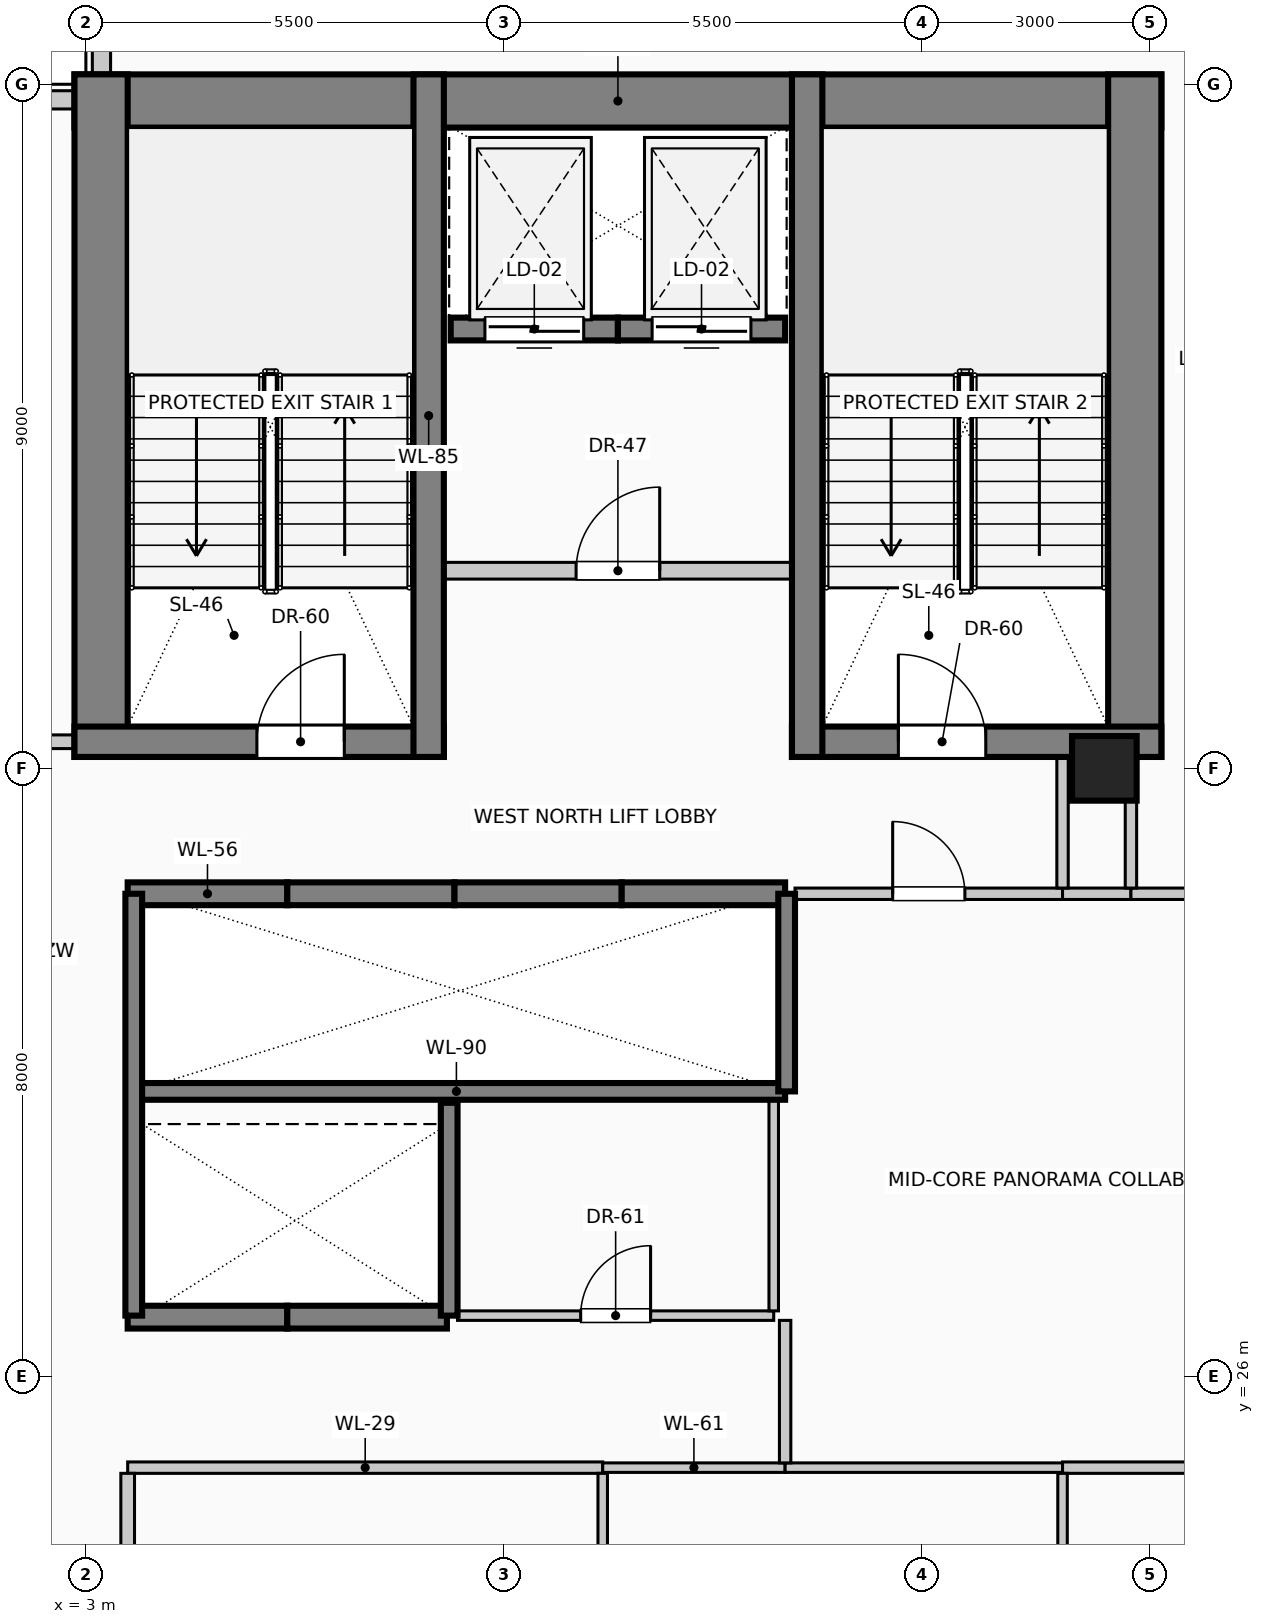
"""IFC4 building model, lengths in metres.
Left out: names, types, materials, properties, quantities, classifications, styles, units other than length and angle.
Written with IfcOpenShell. Run it as: python <this file> out.ifc"""

import sys

from ifc_helpers import new_model, si_unit, direction, frame, frame_2d, origin, origin_2d, place, context, subcontext, project, spatial, rectangle, circle, extrude, element, fill, save


model = new_model("IFC4")
c1 = context("Model", 3, precision=1e-05, world=origin(), true_north=direction((0.0, 1.0)))
c2 = subcontext(c1, "Body", "Model", "MODEL_VIEW")
j1 = project(units=[si_unit("LENGTHUNIT", "METRE"), si_unit("PLANEANGLEUNIT", "RADIAN")], contexts=[c1])
p1 = place(None, origin())
s1 = spatial("IfcSite", under=j1, at=p1, CompositionType="ELEMENT")
p2 = place(p1, origin())
s2 = spatial("IfcBuilding", under=s1, at=p2, CompositionType="ELEMENT")
p3 = place(p2, frame((0.0, 0.0, 234.6)))
s3 = spatial("IfcBuildingStorey", under=s2, at=p3, CompositionType="ELEMENT", Elevation=234.6)
p4 = place(p3, frame((2.85, 42.78, 0.0), z_axis=(0.0, 0.0, 1.0), x_axis=(1.0, 0.0, 0.0)))
e1 = element("IfcWall", 1, at=p4, inside=s3, PredefinedType="SHEAR", context=c2, shape_type="SweptSolid", body=[
    extrude(rectangle(XDim=14.3, YDim=0.7, at=frame_2d((7.15, 0.0))), origin(), (0.0, 0.0, 1.0), 4.0),
])
for number, where, z_axis, x_axis in (
    (2, (3.2, 34.15, 0.0), (0.0, 0.0, 1.0), (0.0, 1.0, 0.0)),
    (3, (16.8, 34.15, 0.0), (0.0, 0.0, 1.0), (0.0, 1.0, 0.0)),
):
    element("IfcWall", number, at=place(p3, frame(where, z_axis=z_axis, x_axis=x_axis)), inside=s3, PredefinedType="SHEAR", context=c2, shape_type="SweptSolid", body=[
        extrude(rectangle(XDim=8.98, YDim=0.7, at=frame_2d((4.49, 0.0))), origin(), (0.0, 0.0, 1.0), 4.0),
    ])
p5 = place(p3, frame((2.85, 34.35, 0.0), z_axis=(0.0, 0.0, 1.0), x_axis=(1.0, 0.0, 0.0)))
e4 = element("IfcWall", 4, at=p5, inside=s3, PredefinedType="SHEAR", context=c2, shape_type="SweptSolid", body=[
    extrude(rectangle(XDim=4.86, YDim=0.4, at=frame_2d((2.43, 0.0))), origin(), (0.0, 0.0, 1.0), 4.0),
])
p6 = place(p5, frame((2.4, 0.0, 0.0)))
e5 = element("IfcOpeningElement", 5, at=p6, cuts=e4, PredefinedType="OPENING", context=c2, shape_type="SweptSolid", body=[
    extrude(rectangle(XDim=1.15, YDim=2.2, at=frame_2d((0.575, 1.1))), frame((0.0, 0.21, 0.0), z_axis=(0.0, -1.0, 0.0), x_axis=(1.0, 0.0, 0.0)), (0.0, 0.0, 1.0), 0.42),
])
p7 = place(p3, frame((12.29, 34.35, 0.0), z_axis=(0.0, 0.0, 1.0), x_axis=(1.0, 0.0, 0.0)))
e6 = element("IfcWall", 6, at=p7, inside=s3, PredefinedType="SHEAR", context=c2, shape_type="SweptSolid", body=[
    extrude(rectangle(XDim=4.86, YDim=0.4, at=frame_2d((2.43, 0.0))), origin(), (0.0, 0.0, 1.0), 4.0),
])
p8 = place(p7, frame((1.4, 0.0, 0.0)))
e7 = element("IfcOpeningElement", 7, at=p8, cuts=e6, PredefinedType="OPENING", context=c2, shape_type="SweptSolid", body=[
    extrude(rectangle(XDim=1.15, YDim=2.2, at=frame_2d((0.575, 1.1))), frame((0.0, 0.21, 0.0), z_axis=(0.0, -1.0, 0.0), x_axis=(1.0, 0.0, 0.0)), (0.0, 0.0, 1.0), 0.42),
])
for number, where, z_axis, x_axis in (
    (8, (7.51, 34.15, 0.0), (0.0, 0.0, 1.0), (0.0, 1.0, 0.0)),
    (9, (12.49, 34.15, 0.0), (0.0, 0.0, 1.0), (0.0, 1.0, 0.0)),
):
    element("IfcWall", number, at=place(p3, frame(where, z_axis=z_axis, x_axis=x_axis)), inside=s3, PredefinedType="SHEAR", context=c2, shape_type="SweptSolid", body=[
        extrude(rectangle(XDim=8.98, YDim=0.4, at=frame_2d((4.49, 0.0))), origin(), (0.0, 0.0, 1.0), 4.0),
    ])
p9 = place(p3, frame((16.4, 34.0, 0.0), z_axis=(0.0, 0.0, 1.0), x_axis=(1.0, 0.0, 0.0)))
e10 = element("IfcColumn", 10, at=p9, inside=s3, PredefinedType="COLUMN", context=c2, shape_type="SweptSolid", body=[
    extrude(circle(Radius=0.425, at=origin_2d()), origin(), (0.0, 0.0, 1.0), 4.0),
])
p10 = place(p3, frame((0.6, 42.795, 0.0), z_axis=(0.0, 0.0, 1.0), x_axis=(1.0, 0.0, 0.0)))
e11 = element("IfcWall", 11, at=p10, inside=s3, PredefinedType="SOLIDWALL", context=c2, shape_type="SweptSolid", body=[
    extrude(rectangle(XDim=2.245, YDim=0.24, at=frame_2d((1.123, 0.0))), origin(), (0.0, 0.0, 1.0), 3.66),
])
p11 = place(p3, frame((3.205, 43.135, 0.0), z_axis=(0.0, 0.0, 1.0), x_axis=(0.0, 1.0, 0.0)))
e12 = element("IfcWall", 12, at=p11, inside=s3, PredefinedType="SOLIDWALL", context=c2, shape_type="SweptSolid", body=[
    extrude(rectangle(XDim=2.265, YDim=0.24, at=frame_2d((1.132, 0.0))), origin(), (0.0, 0.0, 1.0), 3.66),
])
p12 = place(p3, frame((3.55, 32.35, 0.0), z_axis=(0.0, 0.0, 1.0), x_axis=(1.0, 0.0, 0.0)))
e13 = element("IfcWall", 13, at=p12, inside=s3, PredefinedType="SOLIDWALL", context=c2, shape_type="SweptSolid", body=[
    extrude(rectangle(XDim=2.1, YDim=0.3, at=frame_2d((1.05, 0.0))), origin(), (0.0, 0.0, 1.0), 4.0),
])
p13 = place(p3, frame((5.65, 32.35, 0.0), z_axis=(0.0, 0.0, 1.0), x_axis=(1.0, 0.0, 0.0)))
e14 = element("IfcWall", 14, at=p13, inside=s3, PredefinedType="SOLIDWALL", context=c2, shape_type="SweptSolid", body=[
    extrude(rectangle(XDim=2.2, YDim=0.3, at=frame_2d((1.1, 0.0))), origin(), (0.0, 0.0, 1.0), 4.0),
])
p14 = place(p3, frame((7.85, 32.35, 0.0), z_axis=(0.0, 0.0, 1.0), x_axis=(1.0, 0.0, 0.0)))
e15 = element("IfcWall", 15, at=p14, inside=s3, PredefinedType="SOLIDWALL", context=c2, shape_type="SweptSolid", body=[
    extrude(rectangle(XDim=2.2, YDim=0.3, at=frame_2d((1.1, 0.0))), origin(), (0.0, 0.0, 1.0), 4.0),
])
p15 = place(p3, frame((10.05, 32.35, 0.0), z_axis=(0.0, 0.0, 1.0), x_axis=(1.0, 0.0, 0.0)))
e16 = element("IfcWall", 16, at=p15, inside=s3, PredefinedType="SOLIDWALL", context=c2, shape_type="SweptSolid", body=[
    extrude(rectangle(XDim=2.15, YDim=0.3, at=frame_2d((1.075, 0.0))), origin(), (0.0, 0.0, 1.0), 4.0),
])
p16 = place(p3, frame((5.65, 26.78, 0.0), z_axis=(0.0, 0.0, 1.0), x_axis=(-1.0, 0.0, 0.0)))
e17 = element("IfcWall", 17, at=p16, inside=s3, PredefinedType="SOLIDWALL", context=c2, shape_type="SweptSolid", body=[
    extrude(rectangle(XDim=2.1, YDim=0.3, at=frame_2d((1.05, 0.0))), origin(), (0.0, 0.0, 1.0), 4.0),
])
p17 = place(p3, frame((7.75, 26.78, 0.0), z_axis=(0.0, 0.0, 1.0), x_axis=(-1.0, 0.0, 0.0)))
e18 = element("IfcWall", 18, at=p17, inside=s3, PredefinedType="SOLIDWALL", context=c2, shape_type="SweptSolid", body=[
    extrude(rectangle(XDim=2.1, YDim=0.3, at=frame_2d((1.05, 0.0))), origin(), (0.0, 0.0, 1.0), 4.0),
])
p18 = place(p3, frame((10.0, 39.78, 0.0), z_axis=(0.0, 0.0, 1.0), x_axis=(-1.0, 0.0, 0.0)))
e19 = element("IfcWall", 19, at=p18, inside=s3, PredefinedType="SOLIDWALL", context=c2, shape_type="SweptSolid", body=[
    extrude(rectangle(XDim=2.2, YDim=0.3, at=frame_2d((1.1, 0.0))), origin(), (0.0, 0.0, 1.0), 4.0),
])
p19 = place(p18, frame((0.45, 0.0, 0.0)))
e20 = element("IfcOpeningElement", 20, at=p19, cuts=e19, PredefinedType="OPENING", context=c2, shape_type="SweptSolid", body=[
    extrude(rectangle(XDim=1.3, YDim=2.25, at=frame_2d((0.65, 1.125))), frame((0.0, 0.16, 0.0), z_axis=(0.0, -1.0, 0.0), x_axis=(1.0, 0.0, 0.0)), (0.0, 0.0, 1.0), 0.32),
])
p20 = place(p3, frame((12.2, 39.78, 0.0), z_axis=(0.0, 0.0, 1.0), x_axis=(-1.0, 0.0, 0.0)))
e21 = element("IfcWall", 21, at=p20, inside=s3, PredefinedType="SOLIDWALL", context=c2, shape_type="SweptSolid", body=[
    extrude(rectangle(XDim=2.2, YDim=0.3, at=frame_2d((1.1, 0.0))), origin(), (0.0, 0.0, 1.0), 4.0),
])
p21 = place(p20, frame((0.45, 0.0, 0.0)))
e22 = element("IfcOpeningElement", 22, at=p21, cuts=e21, PredefinedType="OPENING", context=c2, shape_type="SweptSolid", body=[
    extrude(rectangle(XDim=1.3, YDim=2.25, at=frame_2d((0.65, 1.125))), frame((0.0, 0.16, 0.0), z_axis=(0.0, -1.0, 0.0), x_axis=(1.0, 0.0, 0.0)), (0.0, 0.0, 1.0), 0.32),
])
p22 = place(p3, frame((3.55, 29.75, 0.0), z_axis=(0.0, 0.0, 1.0), x_axis=(1.0, 0.0, 0.0)))
e23 = element("IfcWall", 23, at=p22, inside=s3, PredefinedType="SOLIDWALL", context=c2, shape_type="SweptSolid", body=[
    extrude(rectangle(XDim=8.65, YDim=0.22, at=frame_2d((4.325, 0.0))), origin(), (0.0, 0.0, 1.0), 4.0),
])
p23 = place(p3, frame((3.63, 26.8, 0.0), z_axis=(0.0, 0.0, 1.0), x_axis=(0.0, 1.0, 0.0)))
e24 = element("IfcWall", 24, at=p23, inside=s3, PredefinedType="SOLIDWALL", context=c2, shape_type="SweptSolid", body=[
    extrude(rectangle(XDim=5.55, YDim=0.22, at=frame_2d((2.775, 0.0))), origin(), (0.0, 0.0, 1.0), 4.0),
])
p24 = place(p3, frame((7.78, 26.8, 0.0), z_axis=(0.0, 0.0, 1.0), x_axis=(0.0, 1.0, 0.0)))
e25 = element("IfcWall", 25, at=p24, inside=s3, PredefinedType="SOLIDWALL", context=c2, shape_type="SweptSolid", body=[
    extrude(rectangle(XDim=2.8, YDim=0.22, at=frame_2d((1.4, 0.0))), origin(), (0.0, 0.0, 1.0), 4.0),
])
p25 = place(p3, frame((12.22, 29.75, 0.0), z_axis=(0.0, 0.0, 1.0), x_axis=(0.0, 1.0, 0.0)))
e26 = element("IfcWall", 26, at=p25, inside=s3, PredefinedType="SOLIDWALL", context=c2, shape_type="SweptSolid", body=[
    extrude(rectangle(XDim=2.6, YDim=0.22, at=frame_2d((1.3, 0.0))), origin(), (0.0, 0.0, 1.0), 4.0),
])
p26 = place(p3, frame((7.51, 36.6, 0.0), z_axis=(0.0, 0.0, 1.0), x_axis=(1.0, 0.0, 0.0)))
e27 = element("IfcWall", 27, at=p26, inside=s3, PredefinedType="PARTITIONING", context=c2, shape_type="SweptSolid", body=[
    extrude(rectangle(XDim=4.98, YDim=0.22, at=frame_2d((2.49, 0.0))), origin(), (0.0, 0.0, 1.0), 3.66),
])
p27 = place(p26, frame((1.94, 0.0, 0.0)))
e28 = element("IfcOpeningElement", 28, at=p27, cuts=e27, PredefinedType="OPENING", context=c2, shape_type="SweptSolid", body=[
    extrude(rectangle(XDim=1.1, YDim=2.2, at=frame_2d((0.55, 1.1))), frame((0.0, 0.12, 0.0), z_axis=(0.0, -1.0, 0.0), x_axis=(1.0, 0.0, 0.0)), (0.0, 0.0, 1.0), 0.24),
])
p28 = place(p3, frame((3.55, 24.8, 0.0), z_axis=(0.0, 0.0, 1.0), x_axis=(1.0, 0.0, 0.0)))
e29 = element("IfcWall", 29, at=p28, inside=s3, PredefinedType="PARTITIONING", context=c2, shape_type="SweptSolid", body=[
    extrude(rectangle(XDim=6.25, YDim=0.15, at=frame_2d((3.125, 0.0))), origin(), (0.0, 0.0, 1.0), 3.66),
])
p29 = place(p3, frame((9.8, 24.8, 0.0), z_axis=(0.0, 0.0, 1.0), x_axis=(1.0, 0.0, 0.0)))
e30 = element("IfcWall", 30, at=p29, inside=s3, PredefinedType="PARTITIONING", context=c2, shape_type="SweptSolid", body=[
    extrude(rectangle(XDim=2.4, YDim=0.125, at=frame_2d((1.2, 0.0))), origin(), (0.0, 0.0, 1.0), 3.66),
])
p30 = place(p3, frame((12.2, 24.8, 0.0), z_axis=(0.0, 0.0, 1.0), x_axis=(1.0, 0.0, 0.0)))
e31 = element("IfcWall", 31, at=p30, inside=s3, PredefinedType="PARTITIONING", context=c2, shape_type="SweptSolid", body=[
    extrude(rectangle(XDim=3.65, YDim=0.125, at=frame_2d((1.825, 0.0))), origin(), (0.0, 0.0, 1.0), 3.66),
])
p31 = place(p3, frame((15.85, 24.8, 0.0), z_axis=(0.0, 0.0, 1.0), x_axis=(1.0, 0.0, 0.0)))
e32 = element("IfcWall", 32, at=p31, inside=s3, PredefinedType="PARTITIONING", context=c2, shape_type="SweptSolid", body=[
    extrude(rectangle(XDim=5.15, YDim=0.15, at=frame_2d((2.575, 0.0))), origin(), (0.0, 0.0, 1.0), 3.66),
])
p32 = place(p3, frame((7.89, 26.8, 0.0), z_axis=(0.0, 0.0, 1.0), x_axis=(1.0, 0.0, 0.0)))
e33 = element("IfcWall", 33, at=p32, inside=s3, PredefinedType="PARTITIONING", context=c2, shape_type="SweptSolid", body=[
    extrude(rectangle(XDim=4.16, YDim=0.125, at=frame_2d((2.08, 0.0))), origin(), (0.0, 0.0, 1.0), 3.66),
])
p33 = place(p32, frame((1.62, 0.0, 0.0)))
e34 = element("IfcOpeningElement", 34, at=p33, cuts=e33, PredefinedType="OPENING", context=c2, shape_type="SweptSolid", body=[
    extrude(rectangle(XDim=0.92, YDim=2.1, at=frame_2d((0.46, 1.05))), frame((0.0, 0.073, 0.0), z_axis=(0.0, -1.0, 0.0), x_axis=(1.0, 0.0, 0.0)), (0.0, 0.0, 1.0), 0.145),
])
p34 = place(p3, frame((12.33, 32.35, 0.0), z_axis=(0.0, 0.0, 1.0), x_axis=(1.0, 0.0, 0.0)))
e35 = element("IfcWall", 35, at=p34, inside=s3, PredefinedType="PARTITIONING", context=c2, shape_type="SweptSolid", body=[
    extrude(rectangle(XDim=3.52, YDim=0.15, at=frame_2d((1.76, 0.0))), origin(), (0.0, 0.0, 1.0), 3.66),
])
p35 = place(p34, frame((1.285, 0.0, 0.0)))
e36 = element("IfcOpeningElement", 36, at=p35, cuts=e35, PredefinedType="OPENING", context=c2, shape_type="SweptSolid", body=[
    extrude(rectangle(XDim=0.95, YDim=2.15, at=frame_2d((0.475, 1.075))), frame((0.0, 0.085, 0.0), z_axis=(0.0, -1.0, 0.0), x_axis=(1.0, 0.0, 0.0)), (0.0, 0.0, 1.0), 0.17),
])
p36 = place(p3, frame((15.85, 32.35, 0.0), z_axis=(0.0, 0.0, 1.0), x_axis=(1.0, 0.0, 0.0)))
e37 = element("IfcWall", 37, at=p36, inside=s3, PredefinedType="PARTITIONING", context=c2, shape_type="SweptSolid", body=[
    extrude(rectangle(XDim=0.9, YDim=0.15, at=frame_2d((0.45, 0.0))), origin(), (0.0, 0.0, 1.0), 3.66),
])
p37 = place(p3, frame((16.75, 32.35, 0.0), z_axis=(0.0, 0.0, 1.0), x_axis=(1.0, 0.0, 0.0)))
e38 = element("IfcWall", 38, at=p37, inside=s3, PredefinedType="PARTITIONING", context=c2, shape_type="SweptSolid", body=[
    extrude(rectangle(XDim=4.25, YDim=0.15, at=frame_2d((2.125, 0.0))), origin(), (0.0, 0.0, 1.0), 3.66),
])
p38 = place(p3, frame((1.1, 34.35, 0.0), z_axis=(0.0, 0.0, 1.0), x_axis=(1.0, 0.0, 0.0)))
e39 = element("IfcWall", 39, at=p38, inside=s3, PredefinedType="PARTITIONING", context=c2, shape_type="SweptSolid", body=[
    extrude(rectangle(XDim=1.75, YDim=0.18, at=frame_2d((0.875, 0.0))), origin(), (0.0, 0.0, 1.0), 3.66),
])
p39 = place(p3, frame((3.55, 17.39, 0.0), z_axis=(0.0, 0.0, 1.0), x_axis=(0.0, 1.0, 0.0)))
e40 = element("IfcWall", 40, at=p39, inside=s3, PredefinedType="PARTITIONING", context=c2, shape_type="SweptSolid", body=[
    extrude(rectangle(XDim=7.335, YDim=0.18, at=frame_2d((3.667, 0.0))), origin(), (0.0, 0.0, 1.0), 3.66),
])
p40 = place(p3, frame((9.8, 17.39, 0.0), z_axis=(0.0, 0.0, 1.0), x_axis=(0.0, 1.0, 0.0)))
e41 = element("IfcWall", 41, at=p40, inside=s3, PredefinedType="PARTITIONING", context=c2, shape_type="SweptSolid", body=[
    extrude(rectangle(XDim=7.335, YDim=0.125, at=frame_2d((3.667, 0.0))), origin(), (0.0, 0.0, 1.0), 3.66),
])
p41 = place(p3, frame((12.05, 26.863, 0.0), z_axis=(0.0, 0.0, 1.0), x_axis=(0.0, 1.0, 0.0)))
e42 = element("IfcWall", 42, at=p41, inside=s3, PredefinedType="PARTITIONING", context=c2, shape_type="SweptSolid", body=[
    extrude(rectangle(XDim=2.777, YDim=0.125, at=frame_2d((1.389, 0.0))), origin(), (0.0, 0.0, 1.0), 3.66),
])
p42 = place(p3, frame((12.2, 24.863, 0.0), z_axis=(0.0, 0.0, 1.0), x_axis=(0.0, 1.0, 0.0)))
e43 = element("IfcWall", 43, at=p42, inside=s3, PredefinedType="PARTITIONING", context=c2, shape_type="SweptSolid", body=[
    extrude(rectangle(XDim=1.875, YDim=0.15, at=frame_2d((0.938, 0.0))), origin(), (0.0, 0.0, 1.0), 3.66),
])
p43 = place(p3, frame((15.85, 17.39, 0.0), z_axis=(0.0, 0.0, 1.0), x_axis=(0.0, 1.0, 0.0)))
e44 = element("IfcWall", 44, at=p43, inside=s3, PredefinedType="PARTITIONING", context=c2, shape_type="SweptSolid", body=[
    extrude(rectangle(XDim=7.335, YDim=0.125, at=frame_2d((3.667, 0.0))), origin(), (0.0, 0.0, 1.0), 3.66),
])
p44 = place(p3, frame((15.85, 32.425, 0.0), z_axis=(0.0, 0.0, 1.0), x_axis=(0.0, 1.0, 0.0)))
e45 = element("IfcWall", 45, at=p44, inside=s3, PredefinedType="PARTITIONING", context=c2, shape_type="SweptSolid", body=[
    extrude(rectangle(XDim=1.725, YDim=0.15, at=frame_2d((0.862, 0.0))), origin(), (0.0, 0.0, 1.0), 3.66),
])
p45 = place(p3, frame((16.75, 32.425, 0.0), z_axis=(0.0, 0.0, 1.0), x_axis=(0.0, 1.0, 0.0)))
e46 = element("IfcWall", 46, at=p45, inside=s3, PredefinedType="PARTITIONING", context=c2, shape_type="SweptSolid", body=[
    extrude(rectangle(XDim=1.15, YDim=0.15, at=frame_2d((0.575, 0.0))), origin(), (0.0, 0.0, 1.0), 3.66),
])
p46 = place(p19, origin())
e47 = element("IfcDoor", 47, at=p46, inside=s3, OperationType="SLIDING_TO_LEFT", PredefinedType="DOOR", context=c2, shape_type="SweptSolid", body=[
    extrude(rectangle(XDim=1.3, YDim=2.25, at=frame_2d((0.65, 1.125))), frame((0.0, 0.025, 0.0), z_axis=(0.0, -1.0, 0.0), x_axis=(1.0, 0.0, 0.0)), (0.0, 0.0, 1.0), 0.05),
])
fill(e20, e47)
p47 = place(p21, origin())
e48 = element("IfcDoor", 48, at=p47, inside=s3, OperationType="SLIDING_TO_RIGHT", PredefinedType="DOOR", context=c2, shape_type="SweptSolid", body=[
    extrude(rectangle(XDim=1.3, YDim=2.25, at=frame_2d((0.65, 1.125))), frame((0.0, 0.025, 0.0), z_axis=(0.0, -1.0, 0.0), x_axis=(1.0, 0.0, 0.0)), (0.0, 0.0, 1.0), 0.05),
])
fill(e22, e48)
p48 = place(p6, origin())
e49 = element("IfcDoor", 49, at=p48, inside=s3, OperationType="SINGLE_SWING_RIGHT", PredefinedType="DOOR", context=c2, shape_type="SweptSolid", body=[
    extrude(rectangle(XDim=1.15, YDim=2.2, at=frame_2d((0.575, 1.1))), frame((0.0, 0.025, 0.0), z_axis=(0.0, -1.0, 0.0), x_axis=(1.0, 0.0, 0.0)), (0.0, 0.0, 1.0), 0.05),
])
fill(e5, e49)
p49 = place(p8, origin())
e50 = element("IfcDoor", 50, at=p49, inside=s3, OperationType="SINGLE_SWING_LEFT", PredefinedType="DOOR", context=c2, shape_type="SweptSolid", body=[
    extrude(rectangle(XDim=1.15, YDim=2.2, at=frame_2d((0.575, 1.1))), frame((0.0, 0.025, 0.0), z_axis=(0.0, -1.0, 0.0), x_axis=(1.0, 0.0, 0.0)), (0.0, 0.0, 1.0), 0.05),
])
fill(e7, e50)
p50 = place(p27, origin())
e51 = element("IfcDoor", 51, at=p50, inside=s3, OperationType="SINGLE_SWING_RIGHT", PredefinedType="DOOR", context=c2, shape_type="SweptSolid", body=[
    extrude(rectangle(XDim=1.1, YDim=2.2, at=frame_2d((0.55, 1.1))), frame((0.0, 0.025, 0.0), z_axis=(0.0, -1.0, 0.0), x_axis=(1.0, 0.0, 0.0)), (0.0, 0.0, 1.0), 0.05),
])
fill(e28, e51)
p51 = place(p33, origin())
e52 = element("IfcDoor", 52, at=p51, inside=s3, OperationType="SINGLE_SWING_RIGHT", PredefinedType="DOOR", context=c2, shape_type="SweptSolid", body=[
    extrude(rectangle(XDim=0.92, YDim=2.1, at=frame_2d((0.46, 1.05))), frame((0.0, 0.025, 0.0), z_axis=(0.0, -1.0, 0.0), x_axis=(1.0, 0.0, 0.0)), (0.0, 0.0, 1.0), 0.05),
])
fill(e34, e52)
p52 = place(p35, origin())
e53 = element("IfcDoor", 53, at=p52, inside=s3, OperationType="SINGLE_SWING_LEFT", PredefinedType="DOOR", context=c2, shape_type="SweptSolid", body=[
    extrude(rectangle(XDim=0.95, YDim=2.15, at=frame_2d((0.475, 1.075))), frame((0.0, 0.025, 0.0), z_axis=(0.0, -1.0, 0.0), x_axis=(1.0, 0.0, 0.0)), (0.0, 0.0, 1.0), 0.05),
])
fill(e36, e53)
save(model, sys.argv[1])
